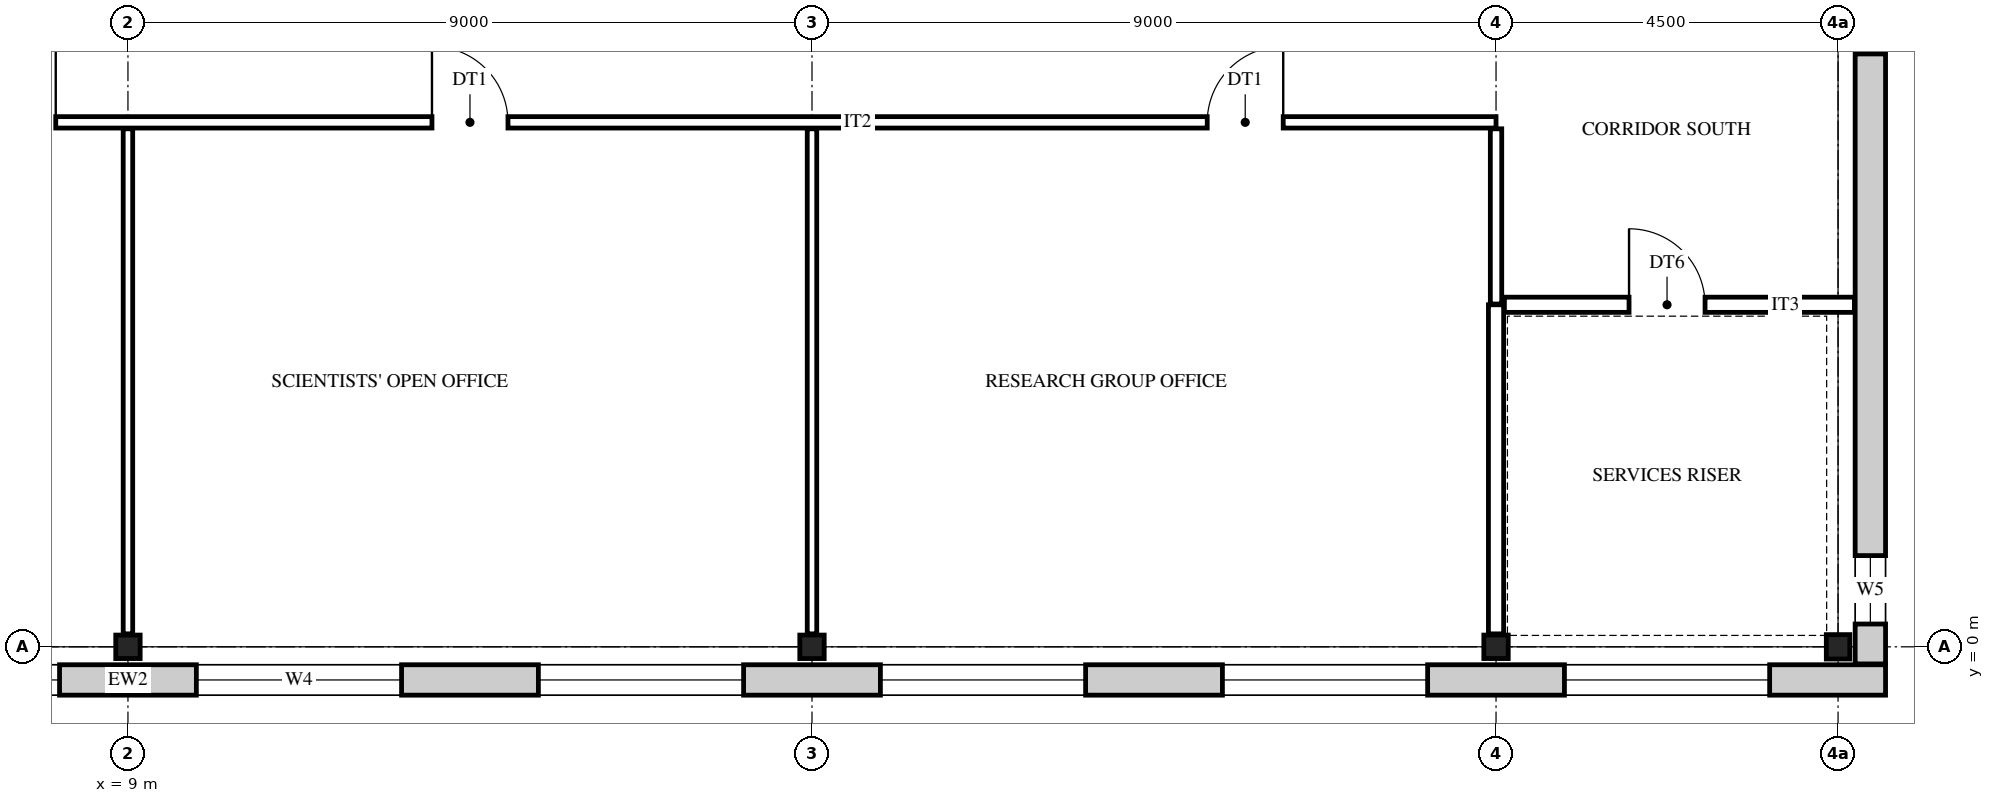
"""IFC4 building model, lengths in metres.
Left out: names, types, materials, properties, quantities, classifications, styles, units other than length and angle.
Written with IfcOpenShell. Run it as: python <this file> out.ifc"""

import sys

from ifc_helpers import new_model, si_unit, direction, frame, frame_2d, origin, origin_2d, place, context, subcontext, project, spatial, rectangle, i_section, extrude, element, fill, save


model = new_model("IFC4")
c1 = context("Model", 3, precision=1e-05, world=origin(), true_north=direction((0.0, 1.0)))
c2 = subcontext(c1, "Body", "Model", "MODEL_VIEW")
j1 = project(units=[si_unit("LENGTHUNIT", "METRE"), si_unit("PLANEANGLEUNIT", "RADIAN")], contexts=[c1])
p1 = place(None, origin())
s1 = spatial("IfcSite", under=j1, at=p1, CompositionType="ELEMENT")
p2 = place(p1, origin())
s2 = spatial("IfcBuilding", under=s1, at=p2, CompositionType="ELEMENT")
p3 = place(p2, frame((0.0, 0.0, 52.8)))
s3 = spatial("IfcBuildingStorey", under=s2, at=p3, CompositionType="ELEMENT", Elevation=52.8)
for number, where, z_axis, x_axis in (
    (1, (9.0, 0.0, 0.0), (0.0, 0.0, 1.0), (0.0, 1.0, 0.0)),
    (2, (18.0, 0.0, 0.0), (0.0, 0.0, 1.0), (0.0, 1.0, 0.0)),
    (3, (27.0, 0.0, 0.0), (0.0, 0.0, 1.0), (0.0, 1.0, 0.0)),
    (4, (31.5, 0.0, 0.0), (0.0, 0.0, 1.0), (1.0, 0.0, 0.0)),
):
    element("IfcColumn", number, at=place(p3, frame(where, z_axis=z_axis, x_axis=x_axis)), inside=s3, PredefinedType="COLUMN", context=c2, shape_type="SweptSolid", body=[
        extrude(i_section(OverallWidth=0.309, OverallDepth=0.321, WebThickness=0.014, FlangeThickness=0.022, FilletRadius=0.017, at=origin_2d()), origin(), (0.0, 0.0, 1.0), 4.2),
    ])
p4 = place(p3, frame((32.125, -0.436, 0.0), z_axis=(0.0, 0.0, 1.0), x_axis=(-1.0, 0.0, 0.0)))
e5 = element("IfcWall", 5, at=p4, inside=s3, PredefinedType="STANDARD", context=c2, shape_type="SweptSolid", body=[
    extrude(rectangle(XDim=32.75, YDim=0.4, at=frame_2d((16.375, 0.0))), origin(), (0.0, 0.0, 1.0), 4.2),
])
p5 = place(p4, frame((28.525, 0.0, 0.9)))
e6 = element("IfcOpeningElement", 6, at=p5, cuts=e5, PredefinedType="OPENING", context=c2, shape_type="SweptSolid", body=[
    extrude(rectangle(XDim=2.7, YDim=2.5, at=frame_2d((1.35, 1.25))), frame((0.0, 0.21, 0.0), z_axis=(0.0, -1.0, 0.0), x_axis=(1.0, 0.0, 0.0)), (0.0, 0.0, 1.0), 0.42),
])
p6 = place(p4, frame((24.025, 0.0, 0.9)))
e7 = element("IfcOpeningElement", 7, at=p6, cuts=e5, PredefinedType="OPENING", context=c2, shape_type="SweptSolid", body=[
    extrude(rectangle(XDim=2.7, YDim=2.5, at=frame_2d((1.35, 1.25))), frame((0.0, 0.21, 0.0), z_axis=(0.0, -1.0, 0.0), x_axis=(1.0, 0.0, 0.0)), (0.0, 0.0, 1.0), 0.42),
])
p7 = place(p4, frame((19.525, 0.0, 0.9)))
e8 = element("IfcOpeningElement", 8, at=p7, cuts=e5, PredefinedType="OPENING", context=c2, shape_type="SweptSolid", body=[
    extrude(rectangle(XDim=2.7, YDim=2.5, at=frame_2d((1.35, 1.25))), frame((0.0, 0.21, 0.0), z_axis=(0.0, -1.0, 0.0), x_axis=(1.0, 0.0, 0.0)), (0.0, 0.0, 1.0), 0.42),
])
p8 = place(p4, frame((15.025, 0.0, 0.9)))
e9 = element("IfcOpeningElement", 9, at=p8, cuts=e5, PredefinedType="OPENING", context=c2, shape_type="SweptSolid", body=[
    extrude(rectangle(XDim=2.7, YDim=2.5, at=frame_2d((1.35, 1.25))), frame((0.0, 0.21, 0.0), z_axis=(0.0, -1.0, 0.0), x_axis=(1.0, 0.0, 0.0)), (0.0, 0.0, 1.0), 0.42),
])
p9 = place(p4, frame((10.525, 0.0, 0.9)))
e10 = element("IfcOpeningElement", 10, at=p9, cuts=e5, PredefinedType="OPENING", context=c2, shape_type="SweptSolid", body=[
    extrude(rectangle(XDim=2.7, YDim=2.5, at=frame_2d((1.35, 1.25))), frame((0.0, 0.21, 0.0), z_axis=(0.0, -1.0, 0.0), x_axis=(1.0, 0.0, 0.0)), (0.0, 0.0, 1.0), 0.42),
])
p10 = place(p4, frame((6.025, 0.0, 0.9)))
e11 = element("IfcOpeningElement", 11, at=p10, cuts=e5, PredefinedType="OPENING", context=c2, shape_type="SweptSolid", body=[
    extrude(rectangle(XDim=2.7, YDim=2.5, at=frame_2d((1.35, 1.25))), frame((0.0, 0.21, 0.0), z_axis=(0.0, -1.0, 0.0), x_axis=(1.0, 0.0, 0.0)), (0.0, 0.0, 1.0), 0.42),
])
p11 = place(p4, frame((1.525, 0.0, 0.9)))
e12 = element("IfcOpeningElement", 12, at=p11, cuts=e5, PredefinedType="OPENING", context=c2, shape_type="SweptSolid", body=[
    extrude(rectangle(XDim=2.7, YDim=2.5, at=frame_2d((1.35, 1.25))), frame((0.0, 0.21, 0.0), z_axis=(0.0, -1.0, 0.0), x_axis=(1.0, 0.0, 0.0)), (0.0, 0.0, 1.0), 0.42),
])
p12 = place(p3, frame((31.925, 27.225, 0.0), z_axis=(0.0, 0.0, 1.0), x_axis=(0.0, -1.0, 0.0)))
e13 = element("IfcWall", 13, at=p12, inside=s3, PredefinedType="STANDARD", context=c2, shape_type="SweptSolid", body=[
    extrude(rectangle(XDim=27.45, YDim=0.4, at=frame_2d((13.725, 0.0))), origin(), (0.0, 0.0, 1.0), 4.2),
])
p13 = place(p12, frame((26.025, 0.0, 0.9)))
e14 = element("IfcOpeningElement", 14, at=p13, cuts=e13, PredefinedType="OPENING", context=c2, shape_type="SweptSolid", body=[
    extrude(rectangle(XDim=0.9, YDim=2.0, at=frame_2d((0.45, 1.0))), frame((0.0, 0.21, 0.0), z_axis=(0.0, -1.0, 0.0), x_axis=(1.0, 0.0, 0.0)), (0.0, 0.0, 1.0), 0.42),
])
p14 = place(p12, frame((18.525, 0.0, 0.9)))
e15 = element("IfcOpeningElement", 15, at=p14, cuts=e13, PredefinedType="OPENING", context=c2, shape_type="SweptSolid", body=[
    extrude(rectangle(XDim=0.9, YDim=2.0, at=frame_2d((0.45, 1.0))), frame((0.0, 0.21, 0.0), z_axis=(0.0, -1.0, 0.0), x_axis=(1.0, 0.0, 0.0)), (0.0, 0.0, 1.0), 0.42),
])
p15 = place(p12, frame((15.675, 0.0, 1.6)))
e16 = element("IfcOpeningElement", 16, at=p15, cuts=e13, PredefinedType="OPENING", context=c2, shape_type="SweptSolid", body=[
    extrude(rectangle(XDim=0.6, YDim=0.9, at=frame_2d((0.3, 0.45))), frame((0.0, 0.21, 0.0), z_axis=(0.0, -1.0, 0.0), x_axis=(1.0, 0.0, 0.0)), (0.0, 0.0, 1.0), 0.42),
])
p16 = place(p12, frame((11.175, 0.0, 1.6)))
e17 = element("IfcOpeningElement", 17, at=p16, cuts=e13, PredefinedType="OPENING", context=c2, shape_type="SweptSolid", body=[
    extrude(rectangle(XDim=0.6, YDim=0.9, at=frame_2d((0.3, 0.45))), frame((0.0, 0.21, 0.0), z_axis=(0.0, -1.0, 0.0), x_axis=(1.0, 0.0, 0.0)), (0.0, 0.0, 1.0), 0.42),
])
p17 = place(p12, frame((8.025, 0.0, 0.9)))
e18 = element("IfcOpeningElement", 18, at=p17, cuts=e13, PredefinedType="OPENING", context=c2, shape_type="SweptSolid", body=[
    extrude(rectangle(XDim=0.9, YDim=2.0, at=frame_2d((0.45, 1.0))), frame((0.0, 0.21, 0.0), z_axis=(0.0, -1.0, 0.0), x_axis=(1.0, 0.0, 0.0)), (0.0, 0.0, 1.0), 0.42),
])
p18 = place(p12, frame((0.525, 0.0, 0.9)))
e19 = element("IfcOpeningElement", 19, at=p18, cuts=e13, PredefinedType="OPENING", context=c2, shape_type="SweptSolid", body=[
    extrude(rectangle(XDim=0.9, YDim=2.0, at=frame_2d((0.45, 1.0))), frame((0.0, 0.21, 0.0), z_axis=(0.0, -1.0, 0.0), x_axis=(1.0, 0.0, 0.0)), (0.0, 0.0, 1.0), 0.42),
])
for number, where, z_axis, x_axis in (
    (20, (9.0, 0.17, 0.0), (0.0, 0.0, 1.0), (0.0, 1.0, 0.0)),
    (21, (18.0, 0.17, 0.0), (0.0, 0.0, 1.0), (0.0, 1.0, 0.0)),
):
    element("IfcWall", number, at=place(p3, frame(where, z_axis=z_axis, x_axis=x_axis)), inside=s3, PredefinedType="PARTITIONING", context=c2, shape_type="SweptSolid", body=[
        extrude(rectangle(XDim=6.645, YDim=0.125, at=frame_2d((3.322, 0.0))), origin(), (0.0, 0.0, 1.0), 3.542),
    ])
p19 = place(p3, frame((27.0, 0.17, 0.0), z_axis=(0.0, 0.0, 1.0), x_axis=(0.0, 1.0, 0.0)))
e22 = element("IfcWall", 22, at=p19, inside=s3, PredefinedType="PARTITIONING", context=c2, shape_type="SweptSolid", body=[
    extrude(rectangle(XDim=4.33, YDim=0.2, at=frame_2d((2.165, 0.0))), origin(), (0.0, 0.0, 1.0), 3.542),
])
p20 = place(p3, frame((27.0, 4.51, 0.0), z_axis=(0.0, 0.0, 1.0), x_axis=(0.0, 1.0, 0.0)))
e23 = element("IfcWall", 23, at=p20, inside=s3, PredefinedType="PARTITIONING", context=c2, shape_type="SweptSolid", body=[
    extrude(rectangle(XDim=2.305, YDim=0.15, at=frame_2d((1.152, 0.0))), origin(), (0.0, 0.0, 1.0), 3.542),
])
p21 = place(p3, frame((27.11, 4.5, 0.0), z_axis=(0.0, 0.0, 1.0), x_axis=(1.0, 0.0, 0.0)))
e24 = element("IfcWall", 24, at=p21, inside=s3, PredefinedType="PARTITIONING", context=c2, shape_type="SweptSolid", body=[
    extrude(rectangle(XDim=4.605, YDim=0.2, at=frame_2d((2.302, 0.0))), origin(), (0.0, 0.0, 1.0), 3.542),
])
p22 = place(p21, frame((1.64, 0.0, 0.0)))
e25 = element("IfcOpeningElement", 25, at=p22, cuts=e24, PredefinedType="OPENING", context=c2, shape_type="SweptSolid", body=[
    extrude(rectangle(XDim=1.0, YDim=2.1, at=frame_2d((0.5, 1.05))), frame((0.0, 0.11, 0.0), z_axis=(0.0, -1.0, 0.0), x_axis=(1.0, 0.0, 0.0)), (0.0, 0.0, 1.0), 0.22),
])
p23 = place(p3, frame((6.9, 6.9, 0.0), z_axis=(0.0, 0.0, 1.0), x_axis=(1.0, 0.0, 0.0)))
e26 = element("IfcWall", 26, at=p23, inside=s3, PredefinedType="PARTITIONING", context=c2, shape_type="SweptSolid", body=[
    extrude(rectangle(XDim=20.1, YDim=0.15, at=frame_2d((10.05, 0.0))), origin(), (0.0, 0.0, 1.0), 3.542),
])
p24 = place(p23, frame((0.15, 0.0, 0.0)))
e27 = element("IfcOpeningElement", 27, at=p24, cuts=e26, PredefinedType="OPENING", context=c2, shape_type="SweptSolid", body=[
    extrude(rectangle(XDim=1.0, YDim=2.1, at=frame_2d((0.5, 1.05))), frame((0.0, 0.085, 0.0), z_axis=(0.0, -1.0, 0.0), x_axis=(1.0, 0.0, 0.0)), (0.0, 0.0, 1.0), 0.17),
])
p25 = place(p23, frame((6.1, 0.0, 0.0)))
e28 = element("IfcOpeningElement", 28, at=p25, cuts=e26, PredefinedType="OPENING", context=c2, shape_type="SweptSolid", body=[
    extrude(rectangle(XDim=1.0, YDim=2.1, at=frame_2d((0.5, 1.05))), frame((0.0, 0.085, 0.0), z_axis=(0.0, -1.0, 0.0), x_axis=(1.0, 0.0, 0.0)), (0.0, 0.0, 1.0), 0.17),
])
p26 = place(p23, frame((16.3, 0.0, 0.0)))
e29 = element("IfcOpeningElement", 29, at=p26, cuts=e26, PredefinedType="OPENING", context=c2, shape_type="SweptSolid", body=[
    extrude(rectangle(XDim=1.0, YDim=2.1, at=frame_2d((0.5, 1.05))), frame((0.0, 0.085, 0.0), z_axis=(0.0, -1.0, 0.0), x_axis=(1.0, 0.0, 0.0)), (0.0, 0.0, 1.0), 0.17),
])
p27 = place(p6, origin())
e30 = element("IfcWindow", 30, at=p27, inside=s3, PartitioningType="SINGLE_PANEL", PredefinedType="WINDOW", context=c2, shape_type="SweptSolid", body=[
    extrude(rectangle(XDim=2.7, YDim=2.5, at=frame_2d((1.35, 1.25))), frame((0.0, 0.03, 0.0), z_axis=(0.0, -1.0, 0.0), x_axis=(1.0, 0.0, 0.0)), (0.0, 0.0, 1.0), 0.06),
])
fill(e7, e30)
p28 = place(p7, origin())
e31 = element("IfcWindow", 31, at=p28, inside=s3, PartitioningType="SINGLE_PANEL", PredefinedType="WINDOW", context=c2, shape_type="SweptSolid", body=[
    extrude(rectangle(XDim=2.7, YDim=2.5, at=frame_2d((1.35, 1.25))), frame((0.0, 0.03, 0.0), z_axis=(0.0, -1.0, 0.0), x_axis=(1.0, 0.0, 0.0)), (0.0, 0.0, 1.0), 0.06),
])
fill(e8, e31)
p29 = place(p8, origin())
e32 = element("IfcWindow", 32, at=p29, inside=s3, PartitioningType="SINGLE_PANEL", PredefinedType="WINDOW", context=c2, shape_type="SweptSolid", body=[
    extrude(rectangle(XDim=2.7, YDim=2.5, at=frame_2d((1.35, 1.25))), frame((0.0, 0.03, 0.0), z_axis=(0.0, -1.0, 0.0), x_axis=(1.0, 0.0, 0.0)), (0.0, 0.0, 1.0), 0.06),
])
fill(e9, e32)
p30 = place(p9, origin())
e33 = element("IfcWindow", 33, at=p30, inside=s3, PartitioningType="SINGLE_PANEL", PredefinedType="WINDOW", context=c2, shape_type="SweptSolid", body=[
    extrude(rectangle(XDim=2.7, YDim=2.5, at=frame_2d((1.35, 1.25))), frame((0.0, 0.03, 0.0), z_axis=(0.0, -1.0, 0.0), x_axis=(1.0, 0.0, 0.0)), (0.0, 0.0, 1.0), 0.06),
])
fill(e10, e33)
p31 = place(p10, origin())
e34 = element("IfcWindow", 34, at=p31, inside=s3, PartitioningType="SINGLE_PANEL", PredefinedType="WINDOW", context=c2, shape_type="SweptSolid", body=[
    extrude(rectangle(XDim=2.7, YDim=2.5, at=frame_2d((1.35, 1.25))), frame((0.0, 0.03, 0.0), z_axis=(0.0, -1.0, 0.0), x_axis=(1.0, 0.0, 0.0)), (0.0, 0.0, 1.0), 0.06),
])
fill(e11, e34)
p32 = place(p11, origin())
e35 = element("IfcWindow", 35, at=p32, inside=s3, PartitioningType="SINGLE_PANEL", PredefinedType="WINDOW", context=c2, shape_type="SweptSolid", body=[
    extrude(rectangle(XDim=2.7, YDim=2.5, at=frame_2d((1.35, 1.25))), frame((0.0, 0.03, 0.0), z_axis=(0.0, -1.0, 0.0), x_axis=(1.0, 0.0, 0.0)), (0.0, 0.0, 1.0), 0.06),
])
fill(e12, e35)
p33 = place(p13, origin())
e36 = element("IfcWindow", 36, at=p33, inside=s3, PartitioningType="SINGLE_PANEL", PredefinedType="WINDOW", context=c2, shape_type="SweptSolid", body=[
    extrude(rectangle(XDim=0.9, YDim=2.0, at=frame_2d((0.45, 1.0))), frame((0.0, 0.03, 0.0), z_axis=(0.0, -1.0, 0.0), x_axis=(1.0, 0.0, 0.0)), (0.0, 0.0, 1.0), 0.06),
])
fill(e14, e36)
p34 = place(p14, origin())
e37 = element("IfcWindow", 37, at=p34, inside=s3, PartitioningType="SINGLE_PANEL", PredefinedType="WINDOW", context=c2, shape_type="SweptSolid", body=[
    extrude(rectangle(XDim=0.9, YDim=2.0, at=frame_2d((0.45, 1.0))), frame((0.0, 0.03, 0.0), z_axis=(0.0, -1.0, 0.0), x_axis=(1.0, 0.0, 0.0)), (0.0, 0.0, 1.0), 0.06),
])
fill(e15, e37)
p35 = place(p22, frame((1.0, 0.0, 0.0), z_axis=(0.0, 0.0, 1.0), x_axis=(-1.0, 0.0, 0.0)))
e38 = element("IfcDoor", 38, at=p35, inside=s3, OperationType="SINGLE_SWING_LEFT", PredefinedType="DOOR", context=c2, shape_type="SweptSolid", body=[
    extrude(rectangle(XDim=1.0, YDim=2.1, at=frame_2d((0.5, 1.05))), frame((0.0, 0.025, 0.0), z_axis=(0.0, -1.0, 0.0), x_axis=(1.0, 0.0, 0.0)), (0.0, 0.0, 1.0), 0.05),
])
fill(e25, e38)
p36 = place(p24, frame((1.0, 0.0, 0.0), z_axis=(0.0, 0.0, 1.0), x_axis=(-1.0, 0.0, 0.0)))
e39 = element("IfcDoor", 39, at=p36, inside=s3, OperationType="SINGLE_SWING_RIGHT", PredefinedType="DOOR", context=c2, shape_type="SweptSolid", body=[
    extrude(rectangle(XDim=1.0, YDim=2.1, at=frame_2d((0.5, 1.05))), frame((0.0, 0.025, 0.0), z_axis=(0.0, -1.0, 0.0), x_axis=(1.0, 0.0, 0.0)), (0.0, 0.0, 1.0), 0.05),
])
fill(e27, e39)
p37 = place(p25, frame((1.0, 0.0, 0.0), z_axis=(0.0, 0.0, 1.0), x_axis=(-1.0, 0.0, 0.0)))
e40 = element("IfcDoor", 40, at=p37, inside=s3, OperationType="SINGLE_SWING_LEFT", PredefinedType="DOOR", context=c2, shape_type="SweptSolid", body=[
    extrude(rectangle(XDim=1.0, YDim=2.1, at=frame_2d((0.5, 1.05))), frame((0.0, 0.025, 0.0), z_axis=(0.0, -1.0, 0.0), x_axis=(1.0, 0.0, 0.0)), (0.0, 0.0, 1.0), 0.05),
])
fill(e28, e40)
p38 = place(p26, frame((1.0, 0.0, 0.0), z_axis=(0.0, 0.0, 1.0), x_axis=(-1.0, 0.0, 0.0)))
e41 = element("IfcDoor", 41, at=p38, inside=s3, OperationType="SINGLE_SWING_RIGHT", PredefinedType="DOOR", context=c2, shape_type="SweptSolid", body=[
    extrude(rectangle(XDim=1.0, YDim=2.1, at=frame_2d((0.5, 1.05))), frame((0.0, 0.025, 0.0), z_axis=(0.0, -1.0, 0.0), x_axis=(1.0, 0.0, 0.0)), (0.0, 0.0, 1.0), 0.05),
])
fill(e29, e41)
save(model, sys.argv[1])
